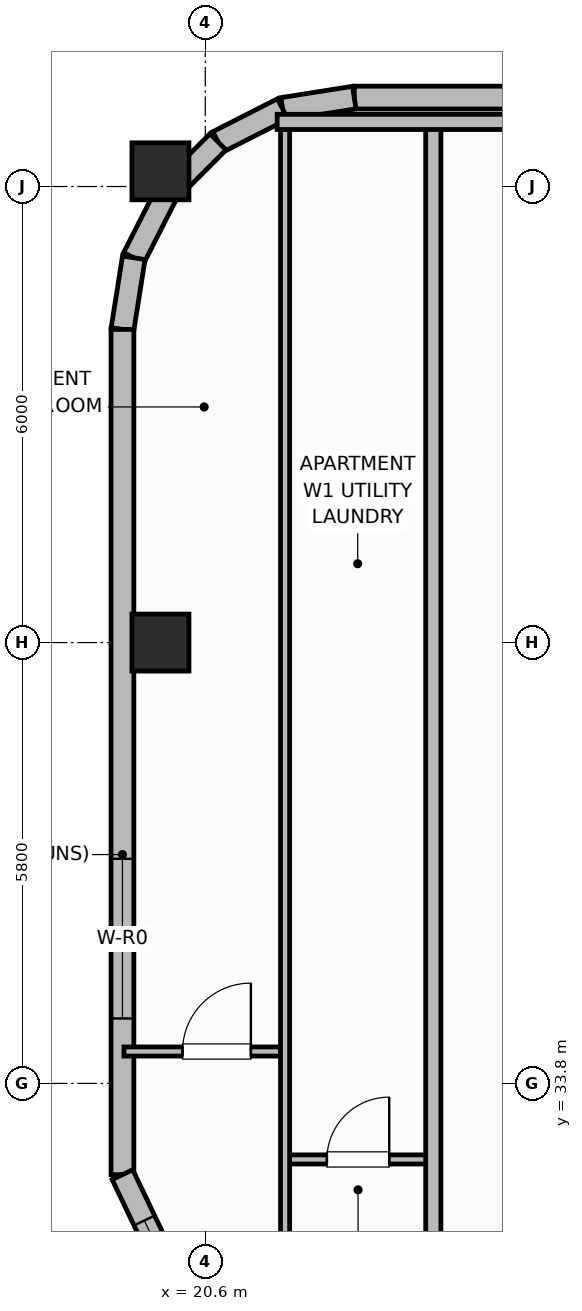
"""IFC4 building model, lengths in metres.
Left out: names, types, materials, properties, quantities, classifications, styles, units other than length and angle.
Written with IfcOpenShell. Run it as: python <this file> out.ifc"""

import sys

from ifc_helpers import new_model, si_unit, direction, frame, frame_2d, origin, origin_2d, place, context, subcontext, project, spatial, rectangle, extrude, element, fill, save


model = new_model("IFC4")
c1 = context("Model", 3, precision=1e-05, world=origin(), true_north=direction((0.0, 1.0)))
c2 = subcontext(c1, "Body", "Model", "MODEL_VIEW")
j1 = project(units=[si_unit("LENGTHUNIT", "METRE"), si_unit("PLANEANGLEUNIT", "RADIAN")], contexts=[c1])
p1 = place(None, origin())
s1 = spatial("IfcSite", under=j1, at=p1, CompositionType="ELEMENT")
p2 = place(p1, origin())
s2 = spatial("IfcBuilding", under=s1, at=p2, CompositionType="ELEMENT")
p3 = place(p2, frame((0.0, 0.0, 278.7)))
s3 = spatial("IfcBuildingStorey", under=s2, at=p3, CompositionType="ELEMENT", Elevation=278.7)
for number, where, z_axis, x_axis in (
    (1, (20.01, 39.6, 0.0), (0.0, 0.0, 1.0), (1.0, 0.0, 0.0)),
    (2, (20.01, 45.8, 0.0), (0.0, 0.0, 1.0), (1.0, 0.0, 0.0)),
):
    element("IfcColumn", number, at=place(p3, frame(where, z_axis=z_axis, x_axis=x_axis)), inside=s3, PredefinedType="COLUMN", context=c2, shape_type="SweptSolid", body=[
        extrude(rectangle(XDim=0.75, YDim=0.75, at=origin_2d()), origin(), (0.0, 0.0, 1.0), 3.7),
    ])
p4 = place(p3, frame((55.84, 46.77, 0.0), z_axis=(0.0, 0.0, 1.0), x_axis=(-1.0, 0.0, 0.0)))
e3 = element("IfcWall", 3, at=p4, inside=s3, PredefinedType="SOLIDWALL", context=c2, shape_type="SweptSolid", body=[
    extrude(rectangle(XDim=33.28, YDim=0.3, at=frame_2d((16.64, 0.0))), origin(), (0.0, 0.0, 1.0), 2.73),
])
p5 = place(p4, frame((4.461, 0.0, 0.95)))
e4 = element("IfcOpeningElement", 4, at=p5, cuts=e3, PredefinedType="OPENING", context=c2, shape_type="SweptSolid", body=[
    extrude(rectangle(XDim=1.1, YDim=1.65, at=frame_2d((0.55, 0.825))), frame((0.0, 0.16, 0.0), z_axis=(0.0, -1.0, 0.0), x_axis=(1.0, 0.0, 0.0)), (0.0, 0.0, 1.0), 0.32),
])
p6 = place(p4, frame((7.368, 0.0, 0.95)))
e5 = element("IfcOpeningElement", 5, at=p6, cuts=e3, PredefinedType="OPENING", context=c2, shape_type="SweptSolid", body=[
    extrude(rectangle(XDim=1.1, YDim=1.65, at=frame_2d((0.55, 0.825))), frame((0.0, 0.16, 0.0), z_axis=(0.0, -1.0, 0.0), x_axis=(1.0, 0.0, 0.0)), (0.0, 0.0, 1.0), 0.32),
])
p7 = place(p4, frame((10.275, 0.0, 0.95)))
e6 = element("IfcOpeningElement", 6, at=p7, cuts=e3, PredefinedType="OPENING", context=c2, shape_type="SweptSolid", body=[
    extrude(rectangle(XDim=1.1, YDim=1.65, at=frame_2d((0.55, 0.825))), frame((0.0, 0.16, 0.0), z_axis=(0.0, -1.0, 0.0), x_axis=(1.0, 0.0, 0.0)), (0.0, 0.0, 1.0), 0.32),
])
p8 = place(p4, frame((13.883, 0.0, 0.95)))
e7 = element("IfcOpeningElement", 7, at=p8, cuts=e3, PredefinedType="OPENING", context=c2, shape_type="SweptSolid", body=[
    extrude(rectangle(XDim=1.1, YDim=1.65, at=frame_2d((0.55, 0.825))), frame((0.0, 0.16, 0.0), z_axis=(0.0, -1.0, 0.0), x_axis=(1.0, 0.0, 0.0)), (0.0, 0.0, 1.0), 0.32),
])
p9 = place(p4, frame((16.09, 0.0, 0.95)))
e8 = element("IfcOpeningElement", 8, at=p9, cuts=e3, PredefinedType="OPENING", context=c2, shape_type="SweptSolid", body=[
    extrude(rectangle(XDim=1.1, YDim=1.65, at=frame_2d((0.55, 0.825))), frame((0.0, 0.16, 0.0), z_axis=(0.0, -1.0, 0.0), x_axis=(1.0, 0.0, 0.0)), (0.0, 0.0, 1.0), 0.32),
])
p10 = place(p4, frame((18.297, 0.0, 0.95)))
e9 = element("IfcOpeningElement", 9, at=p10, cuts=e3, PredefinedType="OPENING", context=c2, shape_type="SweptSolid", body=[
    extrude(rectangle(XDim=1.1, YDim=1.65, at=frame_2d((0.55, 0.825))), frame((0.0, 0.16, 0.0), z_axis=(0.0, -1.0, 0.0), x_axis=(1.0, 0.0, 0.0)), (0.0, 0.0, 1.0), 0.32),
])
p11 = place(p4, frame((21.905, 0.0, 0.95)))
e10 = element("IfcOpeningElement", 10, at=p11, cuts=e3, PredefinedType="OPENING", context=c2, shape_type="SweptSolid", body=[
    extrude(rectangle(XDim=1.1, YDim=1.65, at=frame_2d((0.55, 0.825))), frame((0.0, 0.16, 0.0), z_axis=(0.0, -1.0, 0.0), x_axis=(1.0, 0.0, 0.0)), (0.0, 0.0, 1.0), 0.32),
])
p12 = place(p4, frame((24.812, 0.0, 0.95)))
e11 = element("IfcOpeningElement", 11, at=p12, cuts=e3, PredefinedType="OPENING", context=c2, shape_type="SweptSolid", body=[
    extrude(rectangle(XDim=1.1, YDim=1.65, at=frame_2d((0.55, 0.825))), frame((0.0, 0.16, 0.0), z_axis=(0.0, -1.0, 0.0), x_axis=(1.0, 0.0, 0.0)), (0.0, 0.0, 1.0), 0.32),
])
p13 = place(p4, frame((27.719, 0.0, 0.95)))
e12 = element("IfcOpeningElement", 12, at=p13, cuts=e3, PredefinedType="OPENING", context=c2, shape_type="SweptSolid", body=[
    extrude(rectangle(XDim=1.1, YDim=1.65, at=frame_2d((0.55, 0.825))), frame((0.0, 0.16, 0.0), z_axis=(0.0, -1.0, 0.0), x_axis=(1.0, 0.0, 0.0)), (0.0, 0.0, 1.0), 0.32),
])
p14 = place(p3, frame((22.56, 46.77, 0.0), z_axis=(0.0, 0.0, 1.0), x_axis=(-0.987669453596, -0.156553666304, 0.0)))
e13 = element("IfcWall", 13, at=p14, inside=s3, PredefinedType="SOLIDWALL", context=c2, shape_type="SweptSolid", body=[
    extrude(rectangle(XDim=0.954, YDim=0.3, at=frame_2d((0.477, 0.0))), origin(), (0.0, 0.0, 1.0), 2.73),
])
p15 = place(p3, frame((21.617, 46.621, 0.0), z_axis=(0.0, 0.0, 1.0), x_axis=(-0.891023873617, -0.45395644796, 0.0)))
e14 = element("IfcWall", 14, at=p15, inside=s3, PredefinedType="SOLIDWALL", context=c2, shape_type="SweptSolid", body=[
    extrude(rectangle(XDim=0.954, YDim=0.3, at=frame_2d((0.477, 0.0))), origin(), (0.0, 0.0, 1.0), 2.73),
])
p16 = place(p3, frame((20.767, 46.188, 0.0), z_axis=(0.0, 0.0, 1.0), x_axis=(-0.707106781187, -0.707106781187, 0.0)))
e15 = element("IfcWall", 15, at=p16, inside=s3, PredefinedType="SOLIDWALL", context=c2, shape_type="SweptSolid", body=[
    extrude(rectangle(XDim=0.954, YDim=0.3, at=frame_2d((0.477, 0.0))), origin(), (0.0, 0.0, 1.0), 2.73),
])
p17 = place(p3, frame((20.093, 45.513, 0.0), z_axis=(0.0, 0.0, 1.0), x_axis=(-0.454159573051, -0.890920356825, 0.0)))
e16 = element("IfcWall", 16, at=p17, inside=s3, PredefinedType="SOLIDWALL", context=c2, shape_type="SweptSolid", body=[
    extrude(rectangle(XDim=0.954, YDim=0.3, at=frame_2d((0.477, 0.0))), origin(), (0.0, 0.0, 1.0), 2.73),
])
p18 = place(p3, frame((19.659, 44.663, 0.0), z_axis=(0.0, 0.0, 1.0), x_axis=(-0.156304114255, -0.987708977314, 0.0)))
e17 = element("IfcWall", 17, at=p18, inside=s3, PredefinedType="SOLIDWALL", context=c2, shape_type="SweptSolid", body=[
    extrude(rectangle(XDim=0.954, YDim=0.3, at=frame_2d((0.477, 0.0))), origin(), (0.0, 0.0, 1.0), 2.73),
])
p19 = place(p3, frame((19.51, 43.72, 0.0), z_axis=(0.0, 0.0, 1.0), x_axis=(0.0, -1.0, 0.0)))
e18 = element("IfcWall", 18, at=p19, inside=s3, PredefinedType="SOLIDWALL", context=c2, shape_type="SweptSolid", body=[
    extrude(rectangle(XDim=11.12, YDim=0.3, at=frame_2d((5.56, 0.0))), origin(), (0.0, 0.0, 1.0), 2.73),
])
p20 = place(p19, frame((6.965, 0.0, 0.71)))
e19 = element("IfcOpeningElement", 19, at=p20, cuts=e18, PredefinedType="OPENING", context=c2, shape_type="SweptSolid", body=[
    extrude(rectangle(XDim=2.1, YDim=1.9, at=frame_2d((1.05, 0.95))), frame((0.0, 0.16, 0.0), z_axis=(0.0, -1.0, 0.0), x_axis=(1.0, 0.0, 0.0)), (0.0, 0.0, 1.0), 0.32),
])
p21 = place(p3, frame((19.51, 32.6, 0.0), z_axis=(0.0, 0.0, 1.0), x_axis=(0.430714756408, -0.902488115496, 0.0)))
e20 = element("IfcWall", 20, at=p21, inside=s3, PredefinedType="SOLIDWALL", context=c2, shape_type="SweptSolid", body=[
    extrude(rectangle(XDim=2.438, YDim=0.3, at=frame_2d((1.219, 0.0))), origin(), (0.0, 0.0, 1.0), 2.73),
])
p22 = place(p21, frame((0.669, 0.0, 0.92)))
e21 = element("IfcOpeningElement", 21, at=p22, cuts=e20, PredefinedType="OPENING", context=c2, shape_type="SweptSolid", body=[
    extrude(rectangle(XDim=1.1, YDim=1.65, at=frame_2d((0.55, 0.825))), frame((0.0, 0.16, 0.0), z_axis=(0.0, -1.0, 0.0), x_axis=(1.0, 0.0, 0.0)), (0.0, 0.0, 1.0), 0.32),
])
p23 = place(p3, frame((21.65, 32.8, 0.0), z_axis=(0.0, 0.0, 1.0), x_axis=(1.0, 0.0, 0.0)))
e22 = element("IfcWall", 22, at=p23, inside=s3, PredefinedType="PARTITIONING", context=c2, shape_type="SweptSolid", body=[
    extrude(rectangle(XDim=1.95, YDim=0.12, at=frame_2d((0.975, 0.0))), origin(), (0.0, 0.0, 1.0), 2.56),
])
p24 = place(p23, frame((0.55, 0.0, 0.0)))
e23 = element("IfcOpeningElement", 23, at=p24, cuts=e22, PredefinedType="OPENING", context=c2, shape_type="SweptSolid", body=[
    extrude(rectangle(XDim=0.82, YDim=2.08, at=frame_2d((0.41, 1.04))), frame((0.0, 0.07, 0.0), z_axis=(0.0, -1.0, 0.0), x_axis=(1.0, 0.0, 0.0)), (0.0, 0.0, 1.0), 0.14),
])
p25 = place(p3, frame((19.53, 34.22, 0.0), z_axis=(0.0, 0.0, 1.0), x_axis=(1.0, 0.0, 0.0)))
e24 = element("IfcWall", 24, at=p25, inside=s3, PredefinedType="PARTITIONING", context=c2, shape_type="SweptSolid", body=[
    extrude(rectangle(XDim=2.12, YDim=0.12, at=frame_2d((1.06, 0.0))), origin(), (0.0, 0.0, 1.0), 2.56),
])
p26 = place(p25, frame((0.77, 0.0, 0.0)))
e25 = element("IfcOpeningElement", 25, at=p26, cuts=e24, PredefinedType="OPENING", context=c2, shape_type="SweptSolid", body=[
    extrude(rectangle(XDim=0.9, YDim=2.1, at=frame_2d((0.45, 1.05))), frame((0.0, 0.07, 0.0), z_axis=(0.0, -1.0, 0.0), x_axis=(1.0, 0.0, 0.0)), (0.0, 0.0, 1.0), 0.14),
])
p27 = place(p3, frame((21.65, 9.99, 0.0), z_axis=(0.0, 0.0, 1.0), x_axis=(0.0, 1.0, 0.0)))
e26 = element("IfcWall", 26, at=p27, inside=s3, PredefinedType="PARTITIONING", context=c2, shape_type="SweptSolid", body=[
    extrude(rectangle(XDim=36.42, YDim=0.12, at=frame_2d((18.21, 0.0))), origin(), (0.0, 0.0, 1.0), 2.56),
])
p28 = place(p27, frame((0.41, 0.0, 0.0)))
e27 = element("IfcOpeningElement", 27, at=p28, cuts=e26, PredefinedType="OPENING", context=c2, shape_type="SweptSolid", body=[
    extrude(rectangle(XDim=0.9, YDim=2.1, at=frame_2d((0.45, 1.05))), frame((0.0, 0.07, 0.0), z_axis=(0.0, -1.0, 0.0), x_axis=(1.0, 0.0, 0.0)), (0.0, 0.0, 1.0), 0.14),
])
p29 = place(p27, frame((15.56, 0.0, 0.0)))
e28 = element("IfcOpeningElement", 28, at=p29, cuts=e26, PredefinedType="OPENING", context=c2, shape_type="SweptSolid", body=[
    extrude(rectangle(XDim=0.82, YDim=2.08, at=frame_2d((0.41, 1.04))), frame((0.0, 0.07, 0.0), z_axis=(0.0, -1.0, 0.0), x_axis=(1.0, 0.0, 0.0)), (0.0, 0.0, 1.0), 0.14),
])
p30 = place(p3, frame((23.6, 9.95, 0.0), z_axis=(0.0, 0.0, 1.0), x_axis=(0.0, 1.0, 0.0)))
e29 = element("IfcWall", 29, at=p30, inside=s3, PredefinedType="PARTITIONING", context=c2, shape_type="SweptSolid", body=[
    extrude(rectangle(XDim=36.5, YDim=0.2, at=frame_2d((18.25, 0.0))), origin(), (0.0, 0.0, 1.0), 2.56),
])
p31 = place(p30, frame((3.25, 0.0, 0.0)))
e30 = element("IfcOpeningElement", 30, at=p31, cuts=e29, PredefinedType="OPENING", context=c2, shape_type="SweptSolid", body=[
    extrude(rectangle(XDim=1.0, YDim=2.15, at=frame_2d((0.5, 1.075))), frame((0.0, 0.11, 0.0), z_axis=(0.0, -1.0, 0.0), x_axis=(1.0, 0.0, 0.0)), (0.0, 0.0, 1.0), 0.22),
])
p32 = place(p3, frame((21.546, 46.45, 0.0), z_axis=(0.0, 0.0, 1.0), x_axis=(1.0, 0.0, 0.0)))
e31 = element("IfcWall", 31, at=p32, inside=s3, PredefinedType="PARTITIONING", context=c2, shape_type="SweptSolid", body=[
    extrude(rectangle(XDim=3.754, YDim=0.2, at=frame_2d((1.877, 0.0))), origin(), (0.0, 0.0, 1.0), 2.56),
])
p33 = place(p20, origin())
e32 = element("IfcWindow", 32, at=p33, inside=s3, PartitioningType="SINGLE_PANEL", PredefinedType="WINDOW", context=c2, shape_type="SweptSolid", body=[
    extrude(rectangle(XDim=2.1, YDim=1.9, at=frame_2d((1.05, 0.95))), frame((0.0, 0.03, 0.0), z_axis=(0.0, -1.0, 0.0), x_axis=(1.0, 0.0, 0.0)), (0.0, 0.0, 1.0), 0.06),
])
fill(e19, e32)
p34 = place(p22, origin())
e33 = element("IfcWindow", 33, at=p34, inside=s3, PartitioningType="SINGLE_PANEL", PredefinedType="WINDOW", context=c2, shape_type="SweptSolid", body=[
    extrude(rectangle(XDim=1.1, YDim=1.65, at=frame_2d((0.55, 0.825))), frame((0.0, 0.03, 0.0), z_axis=(0.0, -1.0, 0.0), x_axis=(1.0, 0.0, 0.0)), (0.0, 0.0, 1.0), 0.06),
])
fill(e21, e33)
p35 = place(p24, origin())
e34 = element("IfcDoor", 34, at=p35, inside=s3, OperationType="SINGLE_SWING_RIGHT", PredefinedType="DOOR", context=c2, shape_type="SweptSolid", body=[
    extrude(rectangle(XDim=0.82, YDim=2.08, at=frame_2d((0.41, 1.04))), frame((0.0, 0.025, 0.0), z_axis=(0.0, -1.0, 0.0), x_axis=(1.0, 0.0, 0.0)), (0.0, 0.0, 1.0), 0.05),
])
fill(e23, e34)
p36 = place(p26, origin())
e35 = element("IfcDoor", 35, at=p36, inside=s3, OperationType="SINGLE_SWING_RIGHT", PredefinedType="DOOR", context=c2, shape_type="SweptSolid", body=[
    extrude(rectangle(XDim=0.9, YDim=2.1, at=frame_2d((0.45, 1.05))), frame((0.0, 0.025, 0.0), z_axis=(0.0, -1.0, 0.0), x_axis=(1.0, 0.0, 0.0)), (0.0, 0.0, 1.0), 0.05),
])
fill(e25, e35)
save(model, sys.argv[1])
